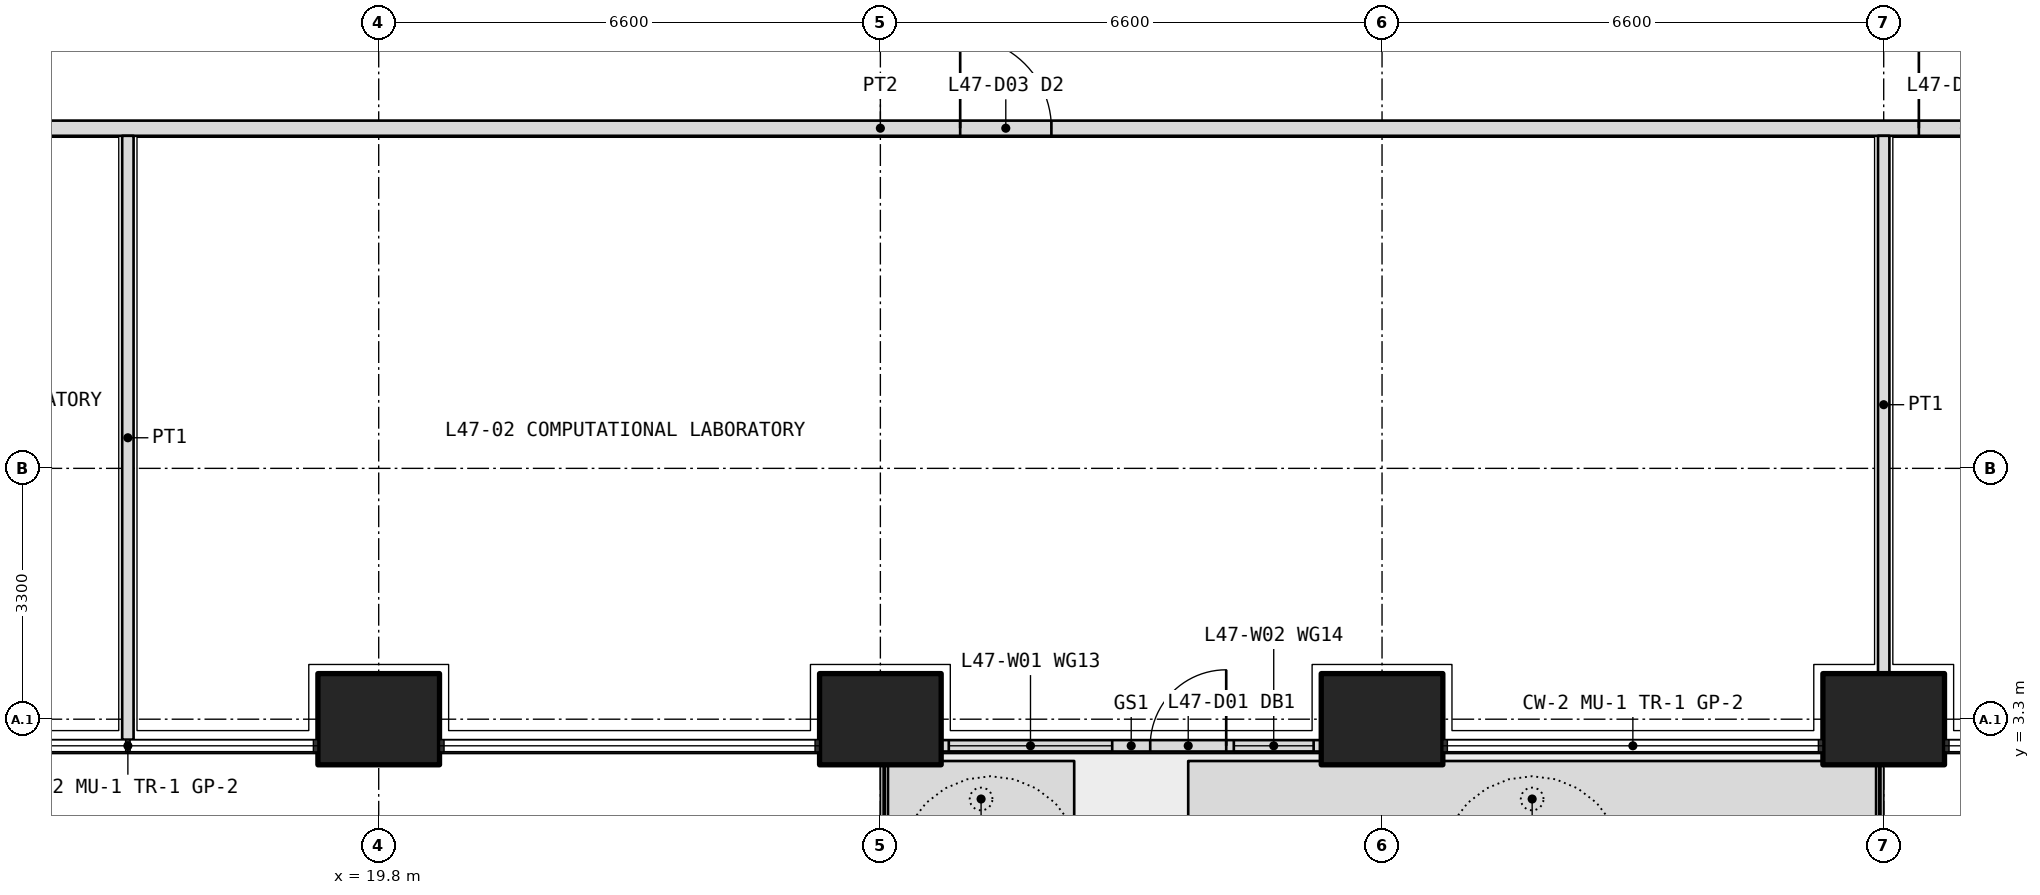
"""IFC4 building model, lengths in metres.
Left out: names, types, materials, properties, quantities, classifications, styles, units other than length and angle.
Written with IfcOpenShell. Run it as: python <this file> out.ifc"""

import sys

from ifc_helpers import new_model, si_unit, direction, frame, frame_2d, origin, origin_2d, place, context, subcontext, project, spatial, polyline, rectangle, outline, extrude, element, fill, save


model = new_model("IFC4")
c1 = context("Model", 3, precision=1e-05, world=origin(), true_north=direction((0.0, 1.0)))
c2 = subcontext(c1, "Body", "Model", "MODEL_VIEW")
j1 = project(units=[si_unit("LENGTHUNIT", "METRE"), si_unit("PLANEANGLEUNIT", "RADIAN")], contexts=[c1])
p1 = place(None, origin())
s1 = spatial("IfcSite", under=j1, at=p1, CompositionType="ELEMENT")
p2 = place(p1, origin())
s2 = spatial("IfcBuilding", under=s1, at=p2, CompositionType="ELEMENT")
p3 = place(p2, frame((0.0, 0.0, 206.1)))
s3 = spatial("IfcBuildingStorey", under=s2, at=p3, CompositionType="ELEMENT", Elevation=206.1)
for number, where, z_axis, x_axis in (
    (1, (19.8, 3.3, 0.0), (0.0, 0.0, 1.0), (1.0, 0.0, 0.0)),
    (2, (26.4, 3.3, 0.0), (0.0, 0.0, 1.0), (1.0, 0.0, 0.0)),
    (3, (33.0, 3.3, 0.0), (0.0, 0.0, 1.0), (1.0, 0.0, 0.0)),
    (4, (39.6, 3.3, 0.0), (0.0, 0.0, 1.0), (1.0, 0.0, 0.0)),
):
    element("IfcColumn", number, at=place(p3, frame(where, z_axis=z_axis, x_axis=x_axis)), inside=s3, PredefinedType="COLUMN", context=c2, shape_type="SweptSolid", body=[
        extrude(rectangle(XDim=1.6, YDim=1.2, at=origin_2d()), origin(), (0.0, 0.0, 1.0), 4.2),
    ])
p4 = place(p3, origin())
e5 = element("IfcWall", 5, at=p4, inside=s3, PredefinedType="USERDEFINED", context=c2, shape_type="SweptSolid", body=[
    extrude(outline(polyline([(26.5, 1.75), (28.95, 1.75), (28.95, 2.75), (26.5, 2.75), (26.5, 1.75)]), holes=[polyline([(26.65, 1.9), (28.8, 1.9), (28.8, 2.6), (26.65, 2.6), (26.65, 1.9)])]), origin(), (0.0, 0.0, 1.0), 1.05),
])
p5 = place(p3, origin())
e6 = element("IfcWall", 6, at=p5, inside=s3, PredefinedType="USERDEFINED", context=c2, shape_type="SweptSolid", body=[
    extrude(outline(polyline([(30.45, 1.75), (39.5, 1.75), (39.5, 2.75), (30.45, 2.75), (30.45, 1.75)]), holes=[polyline([(30.6, 1.9), (39.35, 1.9), (39.35, 2.6), (30.6, 2.6), (30.6, 1.9)])]), origin(), (0.0, 0.0, 1.0), 1.05),
])
p6 = place(p3, frame((27.2, 2.95, 0.0), z_axis=(0.0, 0.0, 1.0), x_axis=(1.0, 0.0, 0.0)))
e7 = element("IfcWall", 7, at=p6, inside=s3, PredefinedType="SOLIDWALL", context=c2, shape_type="SweptSolid", body=[
    extrude(rectangle(XDim=5.0, YDim=0.15, at=frame_2d((2.5, 0.0))), origin(), (0.0, 0.0, 1.0), 2.7),
])
p7 = place(p6, frame((2.75, 0.0, 0.0)))
e8 = element("IfcOpeningElement", 8, at=p7, cuts=e7, PredefinedType="OPENING", context=c2, shape_type="SweptSolid", body=[
    extrude(rectangle(XDim=1.0, YDim=2.4, at=frame_2d((0.5, 1.2))), frame((0.0, 0.085, 0.0), z_axis=(0.0, -1.0, 0.0), x_axis=(1.0, 0.0, 0.0)), (0.0, 0.0, 1.0), 0.17),
])
p8 = place(p6, frame((0.1, 0.0, 0.1)))
e9 = element("IfcOpeningElement", 9, at=p8, cuts=e7, PredefinedType="OPENING", context=c2, shape_type="SweptSolid", body=[
    extrude(rectangle(XDim=2.15, YDim=2.3, at=frame_2d((1.075, 1.15))), frame((0.0, 0.085, 0.0), z_axis=(0.0, -1.0, 0.0), x_axis=(1.0, 0.0, 0.0)), (0.0, 0.0, 1.0), 0.17),
])
p9 = place(p6, frame((3.85, 0.0, 0.1)))
e10 = element("IfcOpeningElement", 10, at=p9, cuts=e7, PredefinedType="OPENING", context=c2, shape_type="SweptSolid", body=[
    extrude(rectangle(XDim=1.05, YDim=2.3, at=frame_2d((0.525, 1.15))), frame((0.0, 0.085, 0.0), z_axis=(0.0, -1.0, 0.0), x_axis=(1.0, 0.0, 0.0)), (0.0, 0.0, 1.0), 0.17),
])
p10 = place(p3, frame((10.975, 11.075, 0.0), z_axis=(0.0, 0.0, 1.0), x_axis=(1.0, 0.0, 0.0)))
e11 = element("IfcWall", 11, at=p10, inside=s3, PredefinedType="PARTITIONING", context=c2, shape_type="SweptSolid", body=[
    extrude(rectangle(XDim=30.85, YDim=0.2, at=frame_2d((15.425, 0.0))), origin(), (0.0, 0.0, 1.0), 2.85),
])
p11 = place(p10, frame((2.212, 0.0, 0.0)))
e12 = element("IfcOpeningElement", 12, at=p11, cuts=e11, PredefinedType="OPENING", context=c2, shape_type="SweptSolid", body=[
    extrude(rectangle(XDim=1.2, YDim=2.1, at=frame_2d((0.6, 1.05))), frame((0.0, 0.11, 0.0), z_axis=(0.0, -1.0, 0.0), x_axis=(1.0, 0.0, 0.0)), (0.0, 0.0, 1.0), 0.22),
])
p12 = place(p10, frame((16.475, 0.0, 0.0)))
e13 = element("IfcOpeningElement", 13, at=p12, cuts=e11, PredefinedType="OPENING", context=c2, shape_type="SweptSolid", body=[
    extrude(rectangle(XDim=1.2, YDim=2.1, at=frame_2d((0.6, 1.05))), frame((0.0, 0.11, 0.0), z_axis=(0.0, -1.0, 0.0), x_axis=(1.0, 0.0, 0.0)), (0.0, 0.0, 1.0), 0.22),
])
p13 = place(p10, frame((29.087, 0.0, 0.0)))
e14 = element("IfcOpeningElement", 14, at=p13, cuts=e11, PredefinedType="OPENING", context=c2, shape_type="SweptSolid", body=[
    extrude(rectangle(XDim=1.2, YDim=2.1, at=frame_2d((0.6, 1.05))), frame((0.0, 0.11, 0.0), z_axis=(0.0, -1.0, 0.0), x_axis=(1.0, 0.0, 0.0)), (0.0, 0.0, 1.0), 0.22),
])
p14 = place(p3, frame((16.5, 3.03, 0.0), z_axis=(0.0, 0.0, 1.0), x_axis=(0.0, 1.0, 0.0)))
e15 = element("IfcWall", 15, at=p14, inside=s3, PredefinedType="PARTITIONING", context=c2, shape_type="SweptSolid", body=[
    extrude(rectangle(XDim=7.945, YDim=0.15, at=frame_2d((3.973, 0.0))), origin(), (0.0, 0.0, 1.0), 2.7),
])
p15 = place(p3, frame((39.6, 3.9, 0.0), z_axis=(0.0, 0.0, 1.0), x_axis=(0.0, 1.0, 0.0)))
e16 = element("IfcWall", 16, at=p15, inside=s3, PredefinedType="PARTITIONING", context=c2, shape_type="SweptSolid", body=[
    extrude(rectangle(XDim=7.075, YDim=0.15, at=frame_2d((3.538, 0.0))), origin(), (0.0, 0.0, 1.0), 2.85),
])
p16 = place(p7, origin())
e17 = element("IfcDoor", 17, at=p16, inside=s3, OperationType="SINGLE_SWING_RIGHT", PredefinedType="DOOR", context=c2, shape_type="SweptSolid", body=[
    extrude(rectangle(XDim=1.0, YDim=2.4, at=frame_2d((0.5, 1.2))), frame((0.0, 0.025, 0.0), z_axis=(0.0, -1.0, 0.0), x_axis=(1.0, 0.0, 0.0)), (0.0, 0.0, 1.0), 0.05),
])
fill(e8, e17)
p17 = place(p8, origin())
e18 = element("IfcWindow", 18, at=p17, inside=s3, PartitioningType="SINGLE_PANEL", PredefinedType="WINDOW", context=c2, shape_type="SweptSolid", body=[
    extrude(rectangle(XDim=2.15, YDim=2.3, at=frame_2d((1.075, 1.15))), frame((0.0, 0.03, 0.0), z_axis=(0.0, -1.0, 0.0), x_axis=(1.0, 0.0, 0.0)), (0.0, 0.0, 1.0), 0.06),
])
fill(e9, e18)
p18 = place(p9, origin())
e19 = element("IfcWindow", 19, at=p18, inside=s3, PartitioningType="SINGLE_PANEL", PredefinedType="WINDOW", context=c2, shape_type="SweptSolid", body=[
    extrude(rectangle(XDim=1.05, YDim=2.3, at=frame_2d((0.525, 1.15))), frame((0.0, 0.03, 0.0), z_axis=(0.0, -1.0, 0.0), x_axis=(1.0, 0.0, 0.0)), (0.0, 0.0, 1.0), 0.06),
])
fill(e10, e19)
p19 = place(p12, origin())
e20 = element("IfcDoor", 20, at=p19, inside=s3, OperationType="DOUBLE_DOOR_SINGLE_SWING", PredefinedType="DOOR", context=c2, shape_type="SweptSolid", body=[
    extrude(rectangle(XDim=1.2, YDim=2.1, at=frame_2d((0.6, 1.05))), frame((0.0, 0.025, 0.0), z_axis=(0.0, -1.0, 0.0), x_axis=(1.0, 0.0, 0.0)), (0.0, 0.0, 1.0), 0.05),
])
fill(e13, e20)
p20 = place(p13, origin())
e21 = element("IfcDoor", 21, at=p20, inside=s3, OperationType="DOUBLE_DOOR_SINGLE_SWING", PredefinedType="DOOR", context=c2, shape_type="SweptSolid", body=[
    extrude(rectangle(XDim=1.2, YDim=2.1, at=frame_2d((0.6, 1.05))), frame((0.0, 0.025, 0.0), z_axis=(0.0, -1.0, 0.0), x_axis=(1.0, 0.0, 0.0)), (0.0, 0.0, 1.0), 0.05),
])
fill(e14, e21)
save(model, sys.argv[1])
